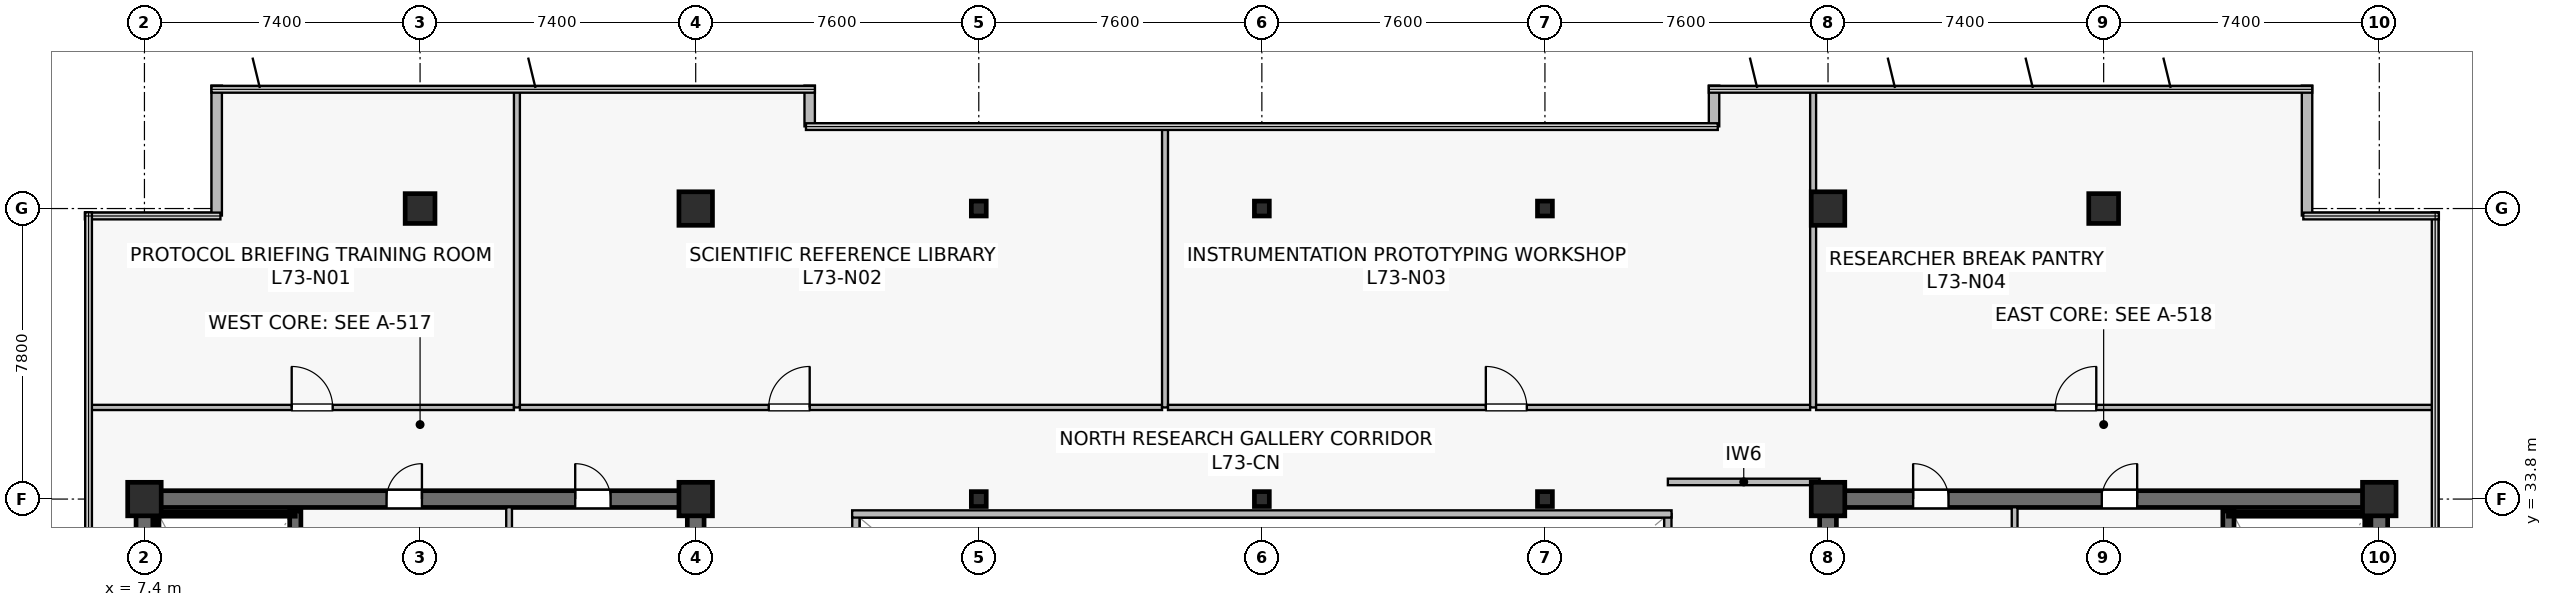
"""IFC4 building model, lengths in metres.
Left out: names, types, materials, properties, quantities, classifications, styles, units other than length and angle.
Written with IfcOpenShell. Run it as: python <this file> out.ifc"""

import sys

from ifc_helpers import new_model, si_unit, direction, frame, frame_2d, origin, origin_2d, place, context, subcontext, project, spatial, rectangle, i_section, extrude, source, transform, mapped, element, fill, save


model = new_model("IFC4")
c1 = context("Model", 3, precision=1e-05, world=origin(), true_north=direction((0.0, 1.0)))
c2 = subcontext(c1, "Body", "Model", "MODEL_VIEW")
j1 = project(units=[si_unit("LENGTHUNIT", "METRE"), si_unit("PLANEANGLEUNIT", "RADIAN")], contexts=[c1])
p1 = place(None, origin())
s1 = spatial("IfcSite", under=j1, at=p1, CompositionType="ELEMENT")
p2 = place(p1, origin())
s2 = spatial("IfcBuilding", under=s1, at=p2, CompositionType="ELEMENT")
p3 = place(p2, frame((0.0, 0.0, 306.0)))
s3 = spatial("IfcBuildingStorey", under=s2, at=p3, CompositionType="ELEMENT", Elevation=306.0)
p4 = place(p3, frame((7.175, 33.8, 0.0), z_axis=(0.0, 0.0, 1.0), x_axis=(1.0, 0.0, 0.0)))
e1 = element("IfcWall", 1, at=p4, inside=s3, PredefinedType="SHEAR", context=c2, shape_type="SweptSolid", body=[
    extrude(rectangle(XDim=15.25, YDim=0.45, at=frame_2d((7.625, 0.0))), origin(), (0.0, 0.0, 1.0), 3.9),
])
p5 = place(p4, frame((6.725, 0.0, 0.0)))
e2 = element("IfcOpeningElement", 2, at=p5, cuts=e1, PredefinedType="OPENING", context=c2, shape_type="SweptSolid", body=[
    extrude(rectangle(XDim=0.95, YDim=2.15, at=frame_2d((0.475, 1.075))), frame((0.0, 0.235, 0.0), z_axis=(0.0, -1.0, 0.0), x_axis=(1.0, 0.0, 0.0)), (0.0, 0.0, 1.0), 0.47),
])
p6 = place(p4, frame((11.79, 0.0, 0.0)))
e3 = element("IfcOpeningElement", 3, at=p6, cuts=e1, PredefinedType="OPENING", context=c2, shape_type="SweptSolid", body=[
    extrude(rectangle(XDim=0.95, YDim=2.15, at=frame_2d((0.475, 1.075))), frame((0.0, 0.235, 0.0), z_axis=(0.0, -1.0, 0.0), x_axis=(1.0, 0.0, 0.0)), (0.0, 0.0, 1.0), 0.47),
])
p7 = place(p3, frame((7.4, 15.025, 0.0), z_axis=(0.0, 0.0, 1.0), x_axis=(0.0, 1.0, 0.0)))
e4 = element("IfcWall", 4, at=p7, inside=s3, PredefinedType="SHEAR", context=c2, shape_type="SweptSolid", body=[
    extrude(rectangle(XDim=18.55, YDim=0.45, at=frame_2d((9.275, 0.0))), origin(), (0.0, 0.0, 1.0), 3.9),
])
p8 = place(p3, frame((22.2, 15.025, 0.0), z_axis=(0.0, 0.0, 1.0), x_axis=(0.0, 1.0, 0.0)))
e5 = element("IfcWall", 5, at=p8, inside=s3, PredefinedType="SHEAR", context=c2, shape_type="SweptSolid", body=[
    extrude(rectangle(XDim=18.55, YDim=0.45, at=frame_2d((9.275, 0.0))), origin(), (0.0, 0.0, 1.0), 3.9),
])
p9 = place(p8, frame((3.525, 0.0, 0.0)))
e6 = element("IfcOpeningElement", 6, at=p9, cuts=e5, PredefinedType="OPENING", context=c2, shape_type="SweptSolid", body=[
    extrude(rectangle(XDim=1.42, YDim=2.2, at=frame_2d((0.71, 1.1))), frame((0.0, 0.235, 0.0), z_axis=(0.0, -1.0, 0.0), x_axis=(1.0, 0.0, 0.0)), (0.0, 0.0, 1.0), 0.47),
])
p10 = place(p3, frame((11.45, 24.85, 0.0), z_axis=(0.0, 0.0, 1.0), x_axis=(0.0, 1.0, 0.0)))
e7 = element("IfcWall", 7, at=p10, inside=s3, PredefinedType="SHEAR", context=c2, shape_type="SweptSolid", body=[
    extrude(rectangle(XDim=8.63, YDim=0.3, at=frame_2d((4.315, 0.0))), origin(), (0.0, 0.0, 1.0), 3.9),
])
p11 = place(p10, frame((0.42, 0.0, 0.0)))
e8 = element("IfcOpeningElement", 8, at=p11, cuts=e7, PredefinedType="OPENING", context=c2, shape_type="SweptSolid", body=[
    extrude(rectangle(XDim=1.1, YDim=2.15, at=frame_2d((0.55, 1.075))), frame((0.0, 0.16, 0.0), z_axis=(0.0, -1.0, 0.0), x_axis=(1.0, 0.0, 0.0)), (0.0, 0.0, 1.0), 0.32),
])
p12 = place(p3, frame((7.73, 33.4, 0.0), z_axis=(0.0, 0.0, 1.0), x_axis=(1.0, 0.0, 0.0)))
e9 = element("IfcWall", 9, at=p12, inside=s3, PredefinedType="SOLIDWALL", context=c2, shape_type="SweptSolid", body=[
    extrude(rectangle(XDim=3.72, YDim=0.12, at=frame_2d((1.86, 0.0))), origin(), (0.0, 0.0, 1.0), 3.9),
])
p13 = place(p3, frame((7.73, 25.0, 0.0), z_axis=(0.0, 0.0, 1.0), x_axis=(0.0, 1.0, 0.0)))
e10 = element("IfcWall", 10, at=p13, inside=s3, PredefinedType="SOLIDWALL", context=c2, shape_type="SweptSolid", body=[
    extrude(rectangle(XDim=8.32, YDim=0.12, at=frame_2d((4.16, 0.0))), origin(), (0.0, 0.0, 1.0), 3.9),
])
p14 = place(p3, frame((52.375, 33.8, 0.0), z_axis=(0.0, 0.0, 1.0), x_axis=(1.0, 0.0, 0.0)))
e11 = element("IfcWall", 11, at=p14, inside=s3, PredefinedType="SHEAR", context=c2, shape_type="SweptSolid", body=[
    extrude(rectangle(XDim=15.25, YDim=0.45, at=frame_2d((7.625, 0.0))), origin(), (0.0, 0.0, 1.0), 3.9),
])
p15 = place(p14, frame((7.575, 0.0, 0.0)))
e12 = element("IfcOpeningElement", 12, at=p15, cuts=e11, PredefinedType="OPENING", context=c2, shape_type="SweptSolid", body=[
    extrude(rectangle(XDim=0.95, YDim=2.15, at=frame_2d((0.475, 1.075))), frame((0.0, 0.235, 0.0), z_axis=(0.0, -1.0, 0.0), x_axis=(1.0, 0.0, 0.0)), (0.0, 0.0, 1.0), 0.47),
])
p16 = place(p14, frame((2.51, 0.0, 0.0)))
e13 = element("IfcOpeningElement", 13, at=p16, cuts=e11, PredefinedType="OPENING", context=c2, shape_type="SweptSolid", body=[
    extrude(rectangle(XDim=0.95, YDim=2.15, at=frame_2d((0.475, 1.075))), frame((0.0, 0.235, 0.0), z_axis=(0.0, -1.0, 0.0), x_axis=(1.0, 0.0, 0.0)), (0.0, 0.0, 1.0), 0.47),
])
p17 = place(p3, frame((52.6, 15.025, 0.0), z_axis=(0.0, 0.0, 1.0), x_axis=(0.0, 1.0, 0.0)))
e14 = element("IfcWall", 14, at=p17, inside=s3, PredefinedType="SHEAR", context=c2, shape_type="SweptSolid", body=[
    extrude(rectangle(XDim=18.55, YDim=0.45, at=frame_2d((9.275, 0.0))), origin(), (0.0, 0.0, 1.0), 3.9),
])
p18 = place(p17, frame((3.525, 0.0, 0.0)))
e15 = element("IfcOpeningElement", 15, at=p18, cuts=e14, PredefinedType="OPENING", context=c2, shape_type="SweptSolid", body=[
    extrude(rectangle(XDim=1.42, YDim=2.2, at=frame_2d((0.71, 1.1))), frame((0.0, 0.235, 0.0), z_axis=(0.0, -1.0, 0.0), x_axis=(1.0, 0.0, 0.0)), (0.0, 0.0, 1.0), 0.47),
])
p19 = place(p3, frame((67.4, 15.025, 0.0), z_axis=(0.0, 0.0, 1.0), x_axis=(0.0, 1.0, 0.0)))
e16 = element("IfcWall", 16, at=p19, inside=s3, PredefinedType="SHEAR", context=c2, shape_type="SweptSolid", body=[
    extrude(rectangle(XDim=18.55, YDim=0.45, at=frame_2d((9.275, 0.0))), origin(), (0.0, 0.0, 1.0), 3.9),
])
p20 = place(p3, frame((63.35, 24.85, 0.0), z_axis=(0.0, 0.0, 1.0), x_axis=(0.0, 1.0, 0.0)))
e17 = element("IfcWall", 17, at=p20, inside=s3, PredefinedType="SHEAR", context=c2, shape_type="SweptSolid", body=[
    extrude(rectangle(XDim=8.63, YDim=0.3, at=frame_2d((4.315, 0.0))), origin(), (0.0, 0.0, 1.0), 3.9),
])
p21 = place(p20, frame((0.42, 0.0, 0.0)))
e18 = element("IfcOpeningElement", 18, at=p21, cuts=e17, PredefinedType="OPENING", context=c2, shape_type="SweptSolid", body=[
    extrude(rectangle(XDim=1.1, YDim=2.15, at=frame_2d((0.55, 1.075))), frame((0.0, 0.16, 0.0), z_axis=(0.0, -1.0, 0.0), x_axis=(1.0, 0.0, 0.0)), (0.0, 0.0, 1.0), 0.32),
])
p22 = place(p3, frame((63.35, 33.4, 0.0), z_axis=(0.0, 0.0, 1.0), x_axis=(1.0, 0.0, 0.0)))
e19 = element("IfcWall", 19, at=p22, inside=s3, PredefinedType="SOLIDWALL", context=c2, shape_type="SweptSolid", body=[
    extrude(rectangle(XDim=3.72, YDim=0.12, at=frame_2d((1.86, 0.0))), origin(), (0.0, 0.0, 1.0), 3.9),
])
p23 = place(p3, frame((67.07, 25.0, 0.0), z_axis=(0.0, 0.0, 1.0), x_axis=(0.0, 1.0, 0.0)))
e20 = element("IfcWall", 20, at=p23, inside=s3, PredefinedType="SOLIDWALL", context=c2, shape_type="SweptSolid", body=[
    extrude(rectangle(XDim=8.32, YDim=0.12, at=frame_2d((4.16, 0.0))), origin(), (0.0, 0.0, 1.0), 3.9),
])
m1 = source(origin(), c2, "Body", "SweptSolid", [
    extrude(rectangle(XDim=0.9, YDim=0.9, at=origin_2d()), origin(), (0.0, 0.0, 1.0), 4.2),
])
for number, where, z_axis, x_axis in (
    (21, (7.4, 33.8, 0.0), (0.0, 0.0, 1.0), (1.0, 0.0, 0.0)),
    (22, (22.2, 33.8, 0.0), (0.0, 0.0, 1.0), (1.0, 0.0, 0.0)),
):
    element("IfcColumn", number, at=place(p3, frame(where, z_axis=z_axis, x_axis=x_axis)), inside=s3, PredefinedType="COLUMN", context=c2, shape_type="MappedRepresentation", body=[
        mapped(m1, transform((0.0, 0.0, 0.0), scale=1.0)),
    ])
m2 = source(origin(), c2, "Body", "SweptSolid", [
    extrude(rectangle(XDim=0.8, YDim=0.8, at=origin_2d()), origin(), (0.0, 0.0, 1.0), 4.2),
])
p24 = place(p3, frame((14.8, 41.6, 0.0), z_axis=(0.0, 0.0, 1.0), x_axis=(1.0, 0.0, 0.0)))
e23 = element("IfcColumn", 23, at=p24, inside=s3, PredefinedType="COLUMN", context=c2, shape_type="MappedRepresentation", body=[
    mapped(m2, transform((0.0, 0.0, 0.0), scale=1.0)),
])
for number, where, z_axis, x_axis in (
    (24, (22.2, 41.6, 0.0), (0.0, 0.0, 1.0), (1.0, 0.0, 0.0)),
    (25, (52.6, 33.8, 0.0), (0.0, 0.0, 1.0), (1.0, 0.0, 0.0)),
    (26, (67.4, 33.8, 0.0), (0.0, 0.0, 1.0), (1.0, 0.0, 0.0)),
    (27, (52.6, 41.6, 0.0), (0.0, 0.0, 1.0), (1.0, 0.0, 0.0)),
):
    element("IfcColumn", number, at=place(p3, frame(where, z_axis=z_axis, x_axis=x_axis)), inside=s3, PredefinedType="COLUMN", context=c2, shape_type="MappedRepresentation", body=[
        mapped(m1, transform((0.0, 0.0, 0.0), scale=1.0)),
    ])
p25 = place(p3, frame((60.0, 41.6, 0.0), z_axis=(0.0, 0.0, 1.0), x_axis=(1.0, 0.0, 0.0)))
e28 = element("IfcColumn", 28, at=p25, inside=s3, PredefinedType="COLUMN", context=c2, shape_type="MappedRepresentation", body=[
    mapped(m2, transform((0.0, 0.0, 0.0), scale=1.0)),
])
m3 = source(origin(), c2, "Body", "SweptSolid", [
    extrude(i_section(OverallWidth=0.4, OverallDepth=0.4, WebThickness=0.021, FlangeThickness=0.021, at=origin_2d()), origin(), (0.0, 0.0, 1.0), 4.2),
])
for number, where, z_axis, x_axis in (
    (29, (29.8, 33.8, 0.0), (0.0, 0.0, 1.0), (1.0, 0.0, 0.0)),
    (30, (29.8, 41.6, 0.0), (0.0, 0.0, 1.0), (1.0, 0.0, 0.0)),
    (31, (37.4, 33.8, 0.0), (0.0, 0.0, 1.0), (1.0, 0.0, 0.0)),
    (32, (37.4, 41.6, 0.0), (0.0, 0.0, 1.0), (1.0, 0.0, 0.0)),
    (33, (45.0, 33.8, 0.0), (0.0, 0.0, 1.0), (1.0, 0.0, 0.0)),
    (34, (45.0, 41.6, 0.0), (0.0, 0.0, 1.0), (1.0, 0.0, 0.0)),
):
    element("IfcColumn", number, at=place(p3, frame(where, z_axis=z_axis, x_axis=x_axis)), inside=s3, PredefinedType="COLUMN", context=c2, shape_type="MappedRepresentation", body=[
        mapped(m3, transform((0.0, 0.0, 0.0), scale=1.0)),
    ])
p26 = place(p3, frame((65.46, 41.412, 0.0), z_axis=(0.0, 0.0, 1.0), x_axis=(0.0, 1.0, 0.0)))
e35 = element("IfcWall", 35, at=p26, inside=s3, PredefinedType="STANDARD", context=c2, shape_type="SweptSolid", body=[
    extrude(rectangle(XDim=3.488, YDim=0.28, at=frame_2d((1.744, 0.0))), origin(), (0.0, 0.0, 1.0), 3.9),
])
for number, where, z_axis, x_axis in (
    (36, (49.54, 44.9, 0.0), (0.0, 0.0, 1.0), (0.0, -1.0, 0.0)),
    (37, (25.26, 43.807, 0.0), (0.0, 0.0, 1.0), (0.0, 1.0, 0.0)),
):
    element("IfcWall", number, at=place(p3, frame(where, z_axis=z_axis, x_axis=x_axis)), inside=s3, PredefinedType="STANDARD", context=c2, shape_type="SweptSolid", body=[
        extrude(rectangle(XDim=1.093, YDim=0.28, at=frame_2d((0.546, 0.0))), origin(), (0.0, 0.0, 1.0), 3.9),
    ])
p27 = place(p3, frame((9.34, 44.9, 0.0), z_axis=(0.0, 0.0, 1.0), x_axis=(0.0, -1.0, 0.0)))
e38 = element("IfcWall", 38, at=p27, inside=s3, PredefinedType="STANDARD", context=c2, shape_type="SweptSolid", body=[
    extrude(rectangle(XDim=3.488, YDim=0.28, at=frame_2d((1.744, 0.0))), origin(), (0.0, 0.0, 1.0), 3.9),
])
for number, where, z_axis, x_axis in (
    (39, (17.19, 29.65, 0.0), (0.0, 0.0, 1.0), (0.0, 1.0, 0.0)),
    (40, (57.61, 29.65, 0.0), (0.0, 0.0, 1.0), (0.0, 1.0, 0.0)),
):
    element("IfcWall", number, at=place(p3, frame(where, z_axis=z_axis, x_axis=x_axis)), inside=s3, PredefinedType="PLUMBINGWALL", context=c2, shape_type="SweptSolid", body=[
        extrude(rectangle(XDim=3.93, YDim=0.155, at=frame_2d((1.965, 0.0))), origin(), (0.0, 0.0, 1.0), 3.9),
    ])
p28 = place(p3, frame((48.3, 34.26, 0.0), z_axis=(0.0, 0.0, 1.0), x_axis=(1.0, 0.0, 0.0)))
e41 = element("IfcWall", 41, at=p28, inside=s3, PredefinedType="PARTITIONING", context=c2, shape_type="SweptSolid", body=[
    extrude(rectangle(XDim=4.075, YDim=0.175, at=frame_2d((2.038, 0.0))), origin(), (0.0, 0.0, 1.0), 3.635),
])
p29 = place(p3, frame((26.5, 15.2, 0.0), z_axis=(0.0, 0.0, 1.0), x_axis=(0.0, 1.0, 0.0)))
e42 = element("IfcWall", 42, at=p29, inside=s3, PredefinedType="SOLIDWALL", context=c2, shape_type="SweptSolid", body=[
    extrude(rectangle(XDim=18.2, YDim=0.195, at=frame_2d((9.1, 0.0))), origin(), (0.0, 0.0, 1.0), 3.9),
])
p30 = place(p29, frame((1.8, 0.0, 0.9)))
e43 = element("IfcOpeningElement", 43, at=p30, cuts=e42, PredefinedType="OPENING", context=c2, shape_type="SweptSolid", body=[
    extrude(rectangle(XDim=1.2, YDim=1.35, at=frame_2d((0.6, 0.675))), frame((0.0, 0.107, 0.0), z_axis=(0.0, -1.0, 0.0), x_axis=(1.0, 0.0, 0.0)), (0.0, 0.0, 1.0), 0.215),
])
p31 = place(p29, frame((13.2, 0.0, 0.9)))
e44 = element("IfcOpeningElement", 44, at=p31, cuts=e42, PredefinedType="OPENING", context=c2, shape_type="SweptSolid", body=[
    extrude(rectangle(XDim=1.2, YDim=1.35, at=frame_2d((0.6, 0.675))), frame((0.0, 0.107, 0.0), z_axis=(0.0, -1.0, 0.0), x_axis=(1.0, 0.0, 0.0)), (0.0, 0.0, 1.0), 0.215),
])
p32 = place(p3, frame((48.3, 15.2, 0.0), z_axis=(0.0, 0.0, 1.0), x_axis=(0.0, 1.0, 0.0)))
e45 = element("IfcWall", 45, at=p32, inside=s3, PredefinedType="SOLIDWALL", context=c2, shape_type="SweptSolid", body=[
    extrude(rectangle(XDim=18.2, YDim=0.195, at=frame_2d((9.1, 0.0))), origin(), (0.0, 0.0, 1.0), 3.9),
])
p33 = place(p32, frame((1.8, 0.0, 0.9)))
e46 = element("IfcOpeningElement", 46, at=p33, cuts=e45, PredefinedType="OPENING", context=c2, shape_type="SweptSolid", body=[
    extrude(rectangle(XDim=1.2, YDim=1.35, at=frame_2d((0.6, 0.675))), frame((0.0, 0.107, 0.0), z_axis=(0.0, -1.0, 0.0), x_axis=(1.0, 0.0, 0.0)), (0.0, 0.0, 1.0), 0.215),
])
p34 = place(p32, frame((13.2, 0.0, 0.9)))
e47 = element("IfcOpeningElement", 47, at=p34, cuts=e45, PredefinedType="OPENING", context=c2, shape_type="SweptSolid", body=[
    extrude(rectangle(XDim=1.2, YDim=1.35, at=frame_2d((0.6, 0.675))), frame((0.0, 0.107, 0.0), z_axis=(0.0, -1.0, 0.0), x_axis=(1.0, 0.0, 0.0)), (0.0, 0.0, 1.0), 0.215),
])
p35 = place(p3, frame((26.4, 33.4, 0.0), z_axis=(0.0, 0.0, 1.0), x_axis=(1.0, 0.0, 0.0)))
e48 = element("IfcWall", 48, at=p35, inside=s3, PredefinedType="SOLIDWALL", context=c2, shape_type="SweptSolid", body=[
    extrude(rectangle(XDim=22.0, YDim=0.195, at=frame_2d((11.0, 0.0))), origin(), (0.0, 0.0, 1.0), 3.9),
])
p36 = place(p3, frame((5.91, 36.26, 0.0), z_axis=(0.0, 0.0, 1.0), x_axis=(1.0, 0.0, 0.0)))
e49 = element("IfcWall", 49, at=p36, inside=s3, PredefinedType="PARTITIONING", context=c2, shape_type="SweptSolid", body=[
    extrude(rectangle(XDim=11.41, YDim=0.14, at=frame_2d((5.705, 0.0))), origin(), (0.0, 0.0, 1.0), 3.297),
])
p37 = place(p36, frame((5.443, 0.0, 0.0)))
e50 = element("IfcOpeningElement", 50, at=p37, cuts=e49, PredefinedType="OPENING", context=c2, shape_type="SweptSolid", body=[
    extrude(rectangle(XDim=1.1, YDim=2.18, at=frame_2d((0.55, 1.09))), frame((0.0, 0.08, 0.0), z_axis=(0.0, -1.0, 0.0), x_axis=(1.0, 0.0, 0.0)), (0.0, 0.0, 1.0), 0.16),
])
p38 = place(p3, frame((17.4, 36.26, 0.0), z_axis=(0.0, 0.0, 1.0), x_axis=(0.0, 1.0, 0.0)))
e51 = element("IfcWall", 51, at=p38, inside=s3, PredefinedType="PARTITIONING", context=c2, shape_type="SweptSolid", body=[
    extrude(rectangle(XDim=8.53, YDim=0.16, at=frame_2d((4.265, 0.0))), origin(), (0.0, 0.0, 1.0), 3.235),
])
p39 = place(p3, frame((17.48, 36.26, 0.0), z_axis=(0.0, 0.0, 1.0), x_axis=(1.0, 0.0, 0.0)))
e52 = element("IfcWall", 52, at=p39, inside=s3, PredefinedType="PARTITIONING", context=c2, shape_type="SweptSolid", body=[
    extrude(rectangle(XDim=17.24, YDim=0.14, at=frame_2d((8.62, 0.0))), origin(), (0.0, 0.0, 1.0), 3.297),
])
p40 = place(p39, frame((6.68, 0.0, 0.0)))
e53 = element("IfcOpeningElement", 53, at=p40, cuts=e52, PredefinedType="OPENING", context=c2, shape_type="SweptSolid", body=[
    extrude(rectangle(XDim=1.1, YDim=2.18, at=frame_2d((0.55, 1.09))), frame((0.0, 0.08, 0.0), z_axis=(0.0, -1.0, 0.0), x_axis=(1.0, 0.0, 0.0)), (0.0, 0.0, 1.0), 0.16),
])
p41 = place(p3, frame((34.8, 36.26, 0.0), z_axis=(0.0, 0.0, 1.0), x_axis=(0.0, 1.0, 0.0)))
e54 = element("IfcWall", 54, at=p41, inside=s3, PredefinedType="PARTITIONING", context=c2, shape_type="SweptSolid", body=[
    extrude(rectangle(XDim=7.53, YDim=0.16, at=frame_2d((3.765, 0.0))), origin(), (0.0, 0.0, 1.0), 2.985),
])
p42 = place(p3, frame((34.88, 36.26, 0.0), z_axis=(0.0, 0.0, 1.0), x_axis=(1.0, 0.0, 0.0)))
e55 = element("IfcWall", 55, at=p42, inside=s3, PredefinedType="PARTITIONING", context=c2, shape_type="SweptSolid", body=[
    extrude(rectangle(XDim=17.24, YDim=0.14, at=frame_2d((8.62, 0.0))), origin(), (0.0, 0.0, 1.0), 3.297),
])
p43 = place(p42, frame((8.533, 0.0, 0.0)))
e56 = element("IfcOpeningElement", 56, at=p43, cuts=e55, PredefinedType="OPENING", context=c2, shape_type="SweptSolid", body=[
    extrude(rectangle(XDim=1.1, YDim=2.18, at=frame_2d((0.55, 1.09))), frame((0.0, 0.08, 0.0), z_axis=(0.0, -1.0, 0.0), x_axis=(1.0, 0.0, 0.0)), (0.0, 0.0, 1.0), 0.16),
])
p44 = place(p3, frame((52.2, 36.26, 0.0), z_axis=(0.0, 0.0, 1.0), x_axis=(0.0, 1.0, 0.0)))
e57 = element("IfcWall", 57, at=p44, inside=s3, PredefinedType="PARTITIONING", context=c2, shape_type="SweptSolid", body=[
    extrude(rectangle(XDim=8.53, YDim=0.16, at=frame_2d((4.265, 0.0))), origin(), (0.0, 0.0, 1.0), 2.985),
])
p45 = place(p3, frame((52.28, 36.26, 0.0), z_axis=(0.0, 0.0, 1.0), x_axis=(1.0, 0.0, 0.0)))
e58 = element("IfcWall", 58, at=p45, inside=s3, PredefinedType="PARTITIONING", context=c2, shape_type="SweptSolid", body=[
    extrude(rectangle(XDim=16.61, YDim=0.14, at=frame_2d((8.305, 0.0))), origin(), (0.0, 0.0, 1.0), 3.297),
])
p46 = place(p45, frame((6.422, 0.0, 0.0)))
e59 = element("IfcOpeningElement", 59, at=p46, cuts=e58, PredefinedType="OPENING", context=c2, shape_type="SweptSolid", body=[
    extrude(rectangle(XDim=1.1, YDim=2.18, at=frame_2d((0.55, 1.09))), frame((0.0, 0.08, 0.0), z_axis=(0.0, -1.0, 0.0), x_axis=(1.0, 0.0, 0.0)), (0.0, 0.0, 1.0), 0.16),
])
m4 = source(origin(), c2, "Body", "SweptSolid", [
    extrude(rectangle(XDim=0.95, YDim=2.15, at=frame_2d((0.475, 1.075))), frame((0.0, 0.025, 0.0), z_axis=(0.0, -1.0, 0.0), x_axis=(1.0, 0.0, 0.0)), (0.0, 0.0, 1.0), 0.05),
])
p47 = place(p5, origin())
e60 = element("IfcDoor", 60, at=p47, inside=s3, OperationType="SINGLE_SWING_RIGHT", PredefinedType="DOOR", context=c2, shape_type="MappedRepresentation", body=[
    mapped(m4, transform((0.0, 0.0, 0.0), scale=1.0)),
])
fill(e2, e60)
p48 = place(p6, origin())
e61 = element("IfcDoor", 61, at=p48, inside=s3, OperationType="SINGLE_SWING_LEFT", PredefinedType="DOOR", context=c2, shape_type="MappedRepresentation", body=[
    mapped(m4, transform((0.0, 0.0, 0.0), scale=1.0)),
])
fill(e3, e61)
p49 = place(p15, origin())
e62 = element("IfcDoor", 62, at=p49, inside=s3, OperationType="SINGLE_SWING_RIGHT", PredefinedType="DOOR", context=c2, shape_type="MappedRepresentation", body=[
    mapped(m4, transform((0.0, 0.0, 0.0), scale=1.0)),
])
fill(e12, e62)
p50 = place(p16, origin())
e63 = element("IfcDoor", 63, at=p50, inside=s3, OperationType="SINGLE_SWING_LEFT", PredefinedType="DOOR", context=c2, shape_type="MappedRepresentation", body=[
    mapped(m4, transform((0.0, 0.0, 0.0), scale=1.0)),
])
fill(e13, e63)
m5 = source(origin(), c2, "Body", "SweptSolid", [
    extrude(rectangle(XDim=1.1, YDim=2.18, at=frame_2d((0.55, 1.09))), frame((0.0, 0.025, 0.0), z_axis=(0.0, -1.0, 0.0), x_axis=(1.0, 0.0, 0.0)), (0.0, 0.0, 1.0), 0.05),
])
p51 = place(p37, origin())
e64 = element("IfcDoor", 64, at=p51, inside=s3, OperationType="SINGLE_SWING_LEFT", PredefinedType="DOOR", context=c2, shape_type="MappedRepresentation", body=[
    mapped(m5, transform((0.0, 0.0, 0.0), scale=1.0)),
])
fill(e50, e64)
p52 = place(p40, origin())
e65 = element("IfcDoor", 65, at=p52, inside=s3, OperationType="SINGLE_SWING_RIGHT", PredefinedType="DOOR", context=c2, shape_type="MappedRepresentation", body=[
    mapped(m5, transform((0.0, 0.0, 0.0), scale=1.0)),
])
fill(e53, e65)
p53 = place(p43, origin())
e66 = element("IfcDoor", 66, at=p53, inside=s3, OperationType="SINGLE_SWING_LEFT", PredefinedType="DOOR", context=c2, shape_type="MappedRepresentation", body=[
    mapped(m5, transform((0.0, 0.0, 0.0), scale=1.0)),
])
fill(e56, e66)
p54 = place(p46, origin())
e67 = element("IfcDoor", 67, at=p54, inside=s3, OperationType="SINGLE_SWING_RIGHT", PredefinedType="DOOR", context=c2, shape_type="MappedRepresentation", body=[
    mapped(m5, transform((0.0, 0.0, 0.0), scale=1.0)),
])
fill(e59, e67)
save(model, sys.argv[1])
